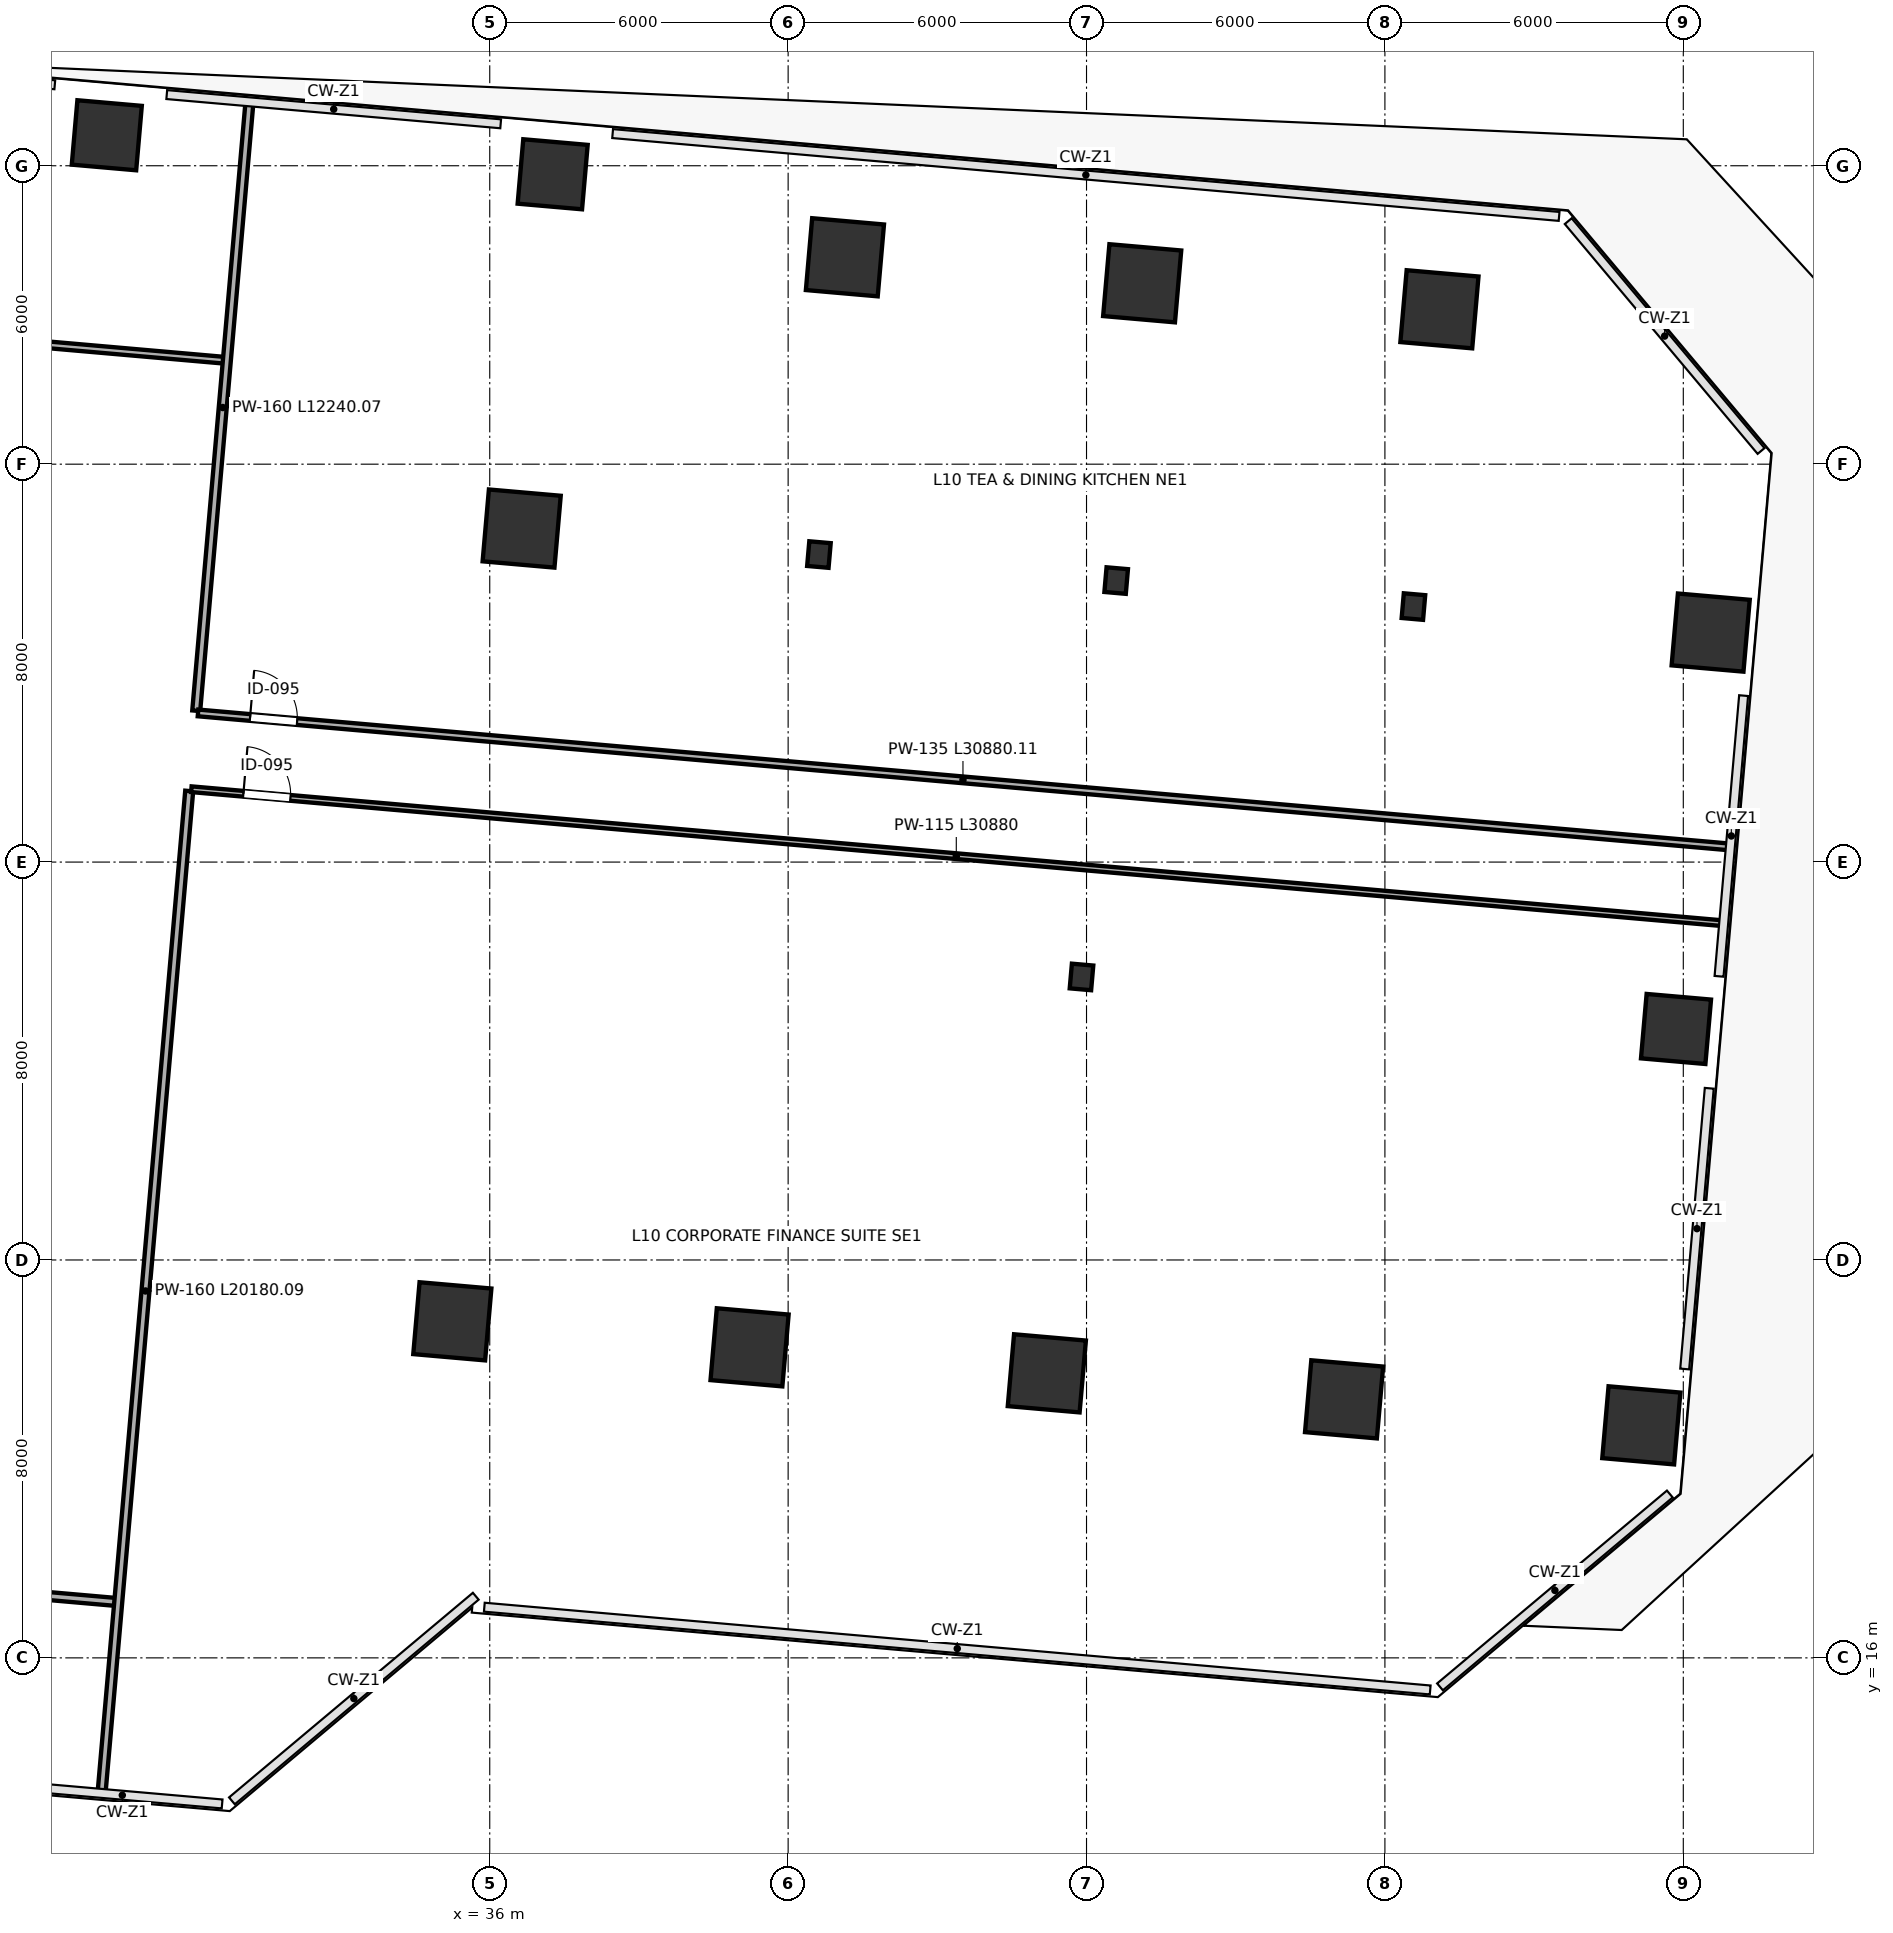
"""IFC4 building model, lengths in metres.
Left out: names, types, materials, properties, quantities, classifications, styles, units other than length and angle.
Written with IfcOpenShell. Run it as: python <this file> out.ifc"""

import sys

from ifc_helpers import new_model, si_unit, direction, frame, frame_2d, origin, origin_2d, place, context, subcontext, project, spatial, rectangle, i_section, extrude, source, transform, mapped, element, fill, save


model = new_model("IFC4")
c1 = context("Model", 3, precision=1e-05, world=origin(), true_north=direction((0.0, 1.0)))
c2 = subcontext(c1, "Body", "Model", "MODEL_VIEW")
j1 = project(units=[si_unit("LENGTHUNIT", "METRE"), si_unit("PLANEANGLEUNIT", "RADIAN")], contexts=[c1])
p1 = place(None, origin())
s1 = spatial("IfcSite", under=j1, at=p1, CompositionType="ELEMENT")
p2 = place(p1, origin())
s2 = spatial("IfcBuilding", under=s1, at=p2, CompositionType="ELEMENT")
p3 = place(p2, frame((0.0, 0.0, 47.2)))
s3 = spatial("IfcBuildingStorey", under=s2, at=p3, CompositionType="ELEMENT", Elevation=47.2)
m1 = source(origin(), c2, "Body", "SweptSolid", [
    extrude(rectangle(XDim=1.3, YDim=1.3, at=origin_2d()), origin(), (0.0, 0.0, 1.0), 4.799),
])
p4 = place(p3, frame((28.3, 46.613, 0.001), z_axis=(0.0, 0.0, 1.0), x_axis=(-0.996194698092, 0.087155742748, 0.0)))
e1 = element("IfcColumn", 1, at=p4, inside=s3, PredefinedType="COLUMN", context=c2, shape_type="MappedRepresentation", body=[
    mapped(m1, transform((0.0, 0.0, 0.0), scale=1.0)),
])
m2 = source(origin(), c2, "Body", "SweptSolid", [
    extrude(rectangle(XDim=1.45, YDim=1.45, at=origin_2d()), origin(), (0.0, 0.0, 1.0), 4.799),
])
for number, where, z_axis, x_axis in (
    (2, (35.248, 22.767, 0.001), (0.0, 0.0, 1.0), (-0.996, 0.087, 0.0)),
    (3, (36.642, 38.706, 0.001), (0.0, 0.0, 1.0), (-0.996, 0.087, 0.0)),
):
    element("IfcColumn", number, at=place(p3, frame(where, z_axis=z_axis, x_axis=x_axis)), inside=s3, PredefinedType="COLUMN", context=c2, shape_type="MappedRepresentation", body=[
        mapped(m2, transform((0.0, 0.0, 0.0), scale=1.0)),
    ])
p5 = place(p3, frame((37.265, 45.829, 0.001), z_axis=(0.0, 0.0, 1.0), x_axis=(-0.996194698092, 0.087155742748, 0.0)))
e4 = element("IfcColumn", 4, at=p5, inside=s3, PredefinedType="COLUMN", context=c2, shape_type="MappedRepresentation", body=[
    mapped(m1, transform((0.0, 0.0, 0.0), scale=1.0)),
])
p6 = place(p3, frame((41.225, 22.244, 0.001), z_axis=(0.0, 0.0, 1.0), x_axis=(-0.996194698092, 0.087155742748, 0.0)))
e5 = element("IfcColumn", 5, at=p6, inside=s3, PredefinedType="COLUMN", context=c2, shape_type="MappedRepresentation", body=[
    mapped(m2, transform((0.0, 0.0, 0.0), scale=1.0)),
])
m3 = source(origin(), c2, "Body", "SweptSolid", [
    extrude(i_section(OverallWidth=0.432, OverallDepth=0.498, WebThickness=0.056, FlangeThickness=0.089, FilletRadius=0.015, at=origin_2d()), origin(), (0.0, 0.0, 1.0), 4.799),
])
p7 = place(p3, frame((42.619, 38.183, 0.001), z_axis=(0.0, 0.0, 1.0), x_axis=(-0.996194698092, 0.087155742748, 0.0)))
e6 = element("IfcColumn", 6, at=p7, inside=s3, PredefinedType="COLUMN", context=c2, shape_type="MappedRepresentation", body=[
    mapped(m3, transform((0.0, 0.0, 0.0), scale=1.0)),
])
for number, where, z_axis, x_axis in (
    (7, (43.142, 44.16, 0.001), (0.0, 0.0, 1.0), (-0.996, 0.087, 0.0)),
    (8, (47.202, 21.721, 0.001), (0.0, 0.0, 1.0), (-0.996, 0.087, 0.0)),
):
    element("IfcColumn", number, at=place(p3, frame(where, z_axis=z_axis, x_axis=x_axis)), inside=s3, PredefinedType="COLUMN", context=c2, shape_type="MappedRepresentation", body=[
        mapped(m2, transform((0.0, 0.0, 0.0), scale=1.0)),
    ])
for number, where, z_axis, x_axis in (
    (9, (47.899, 29.69, 0.001), (0.0, 0.0, 1.0), (-0.996, 0.087, 0.0)),
    (10, (48.596, 37.66, 0.001), (0.0, 0.0, 1.0), (-0.996, 0.087, 0.0)),
):
    element("IfcColumn", number, at=place(p3, frame(where, z_axis=z_axis, x_axis=x_axis)), inside=s3, PredefinedType="COLUMN", context=c2, shape_type="MappedRepresentation", body=[
        mapped(m3, transform((0.0, 0.0, 0.0), scale=1.0)),
    ])
for number, where, z_axis, x_axis in (
    (11, (49.119, 43.637, 0.001), (0.0, 0.0, 1.0), (-0.996, 0.087, 0.0)),
    (12, (53.179, 21.198, 0.001), (0.0, 0.0, 1.0), (-0.996, 0.087, 0.0)),
):
    element("IfcColumn", number, at=place(p3, frame(where, z_axis=z_axis, x_axis=x_axis)), inside=s3, PredefinedType="COLUMN", context=c2, shape_type="MappedRepresentation", body=[
        mapped(m2, transform((0.0, 0.0, 0.0), scale=1.0)),
    ])
p8 = place(p3, frame((54.573, 37.137, 0.001), z_axis=(0.0, 0.0, 1.0), x_axis=(-0.996194698092, 0.087155742748, 0.0)))
e13 = element("IfcColumn", 13, at=p8, inside=s3, PredefinedType="COLUMN", context=c2, shape_type="MappedRepresentation", body=[
    mapped(m3, transform((0.0, 0.0, 0.0), scale=1.0)),
])
p9 = place(p3, frame((55.096, 43.114, 0.001), z_axis=(0.0, 0.0, 1.0), x_axis=(-0.996194698092, 0.087155742748, 0.0)))
e14 = element("IfcColumn", 14, at=p9, inside=s3, PredefinedType="COLUMN", context=c2, shape_type="MappedRepresentation", body=[
    mapped(m2, transform((0.0, 0.0, 0.0), scale=1.0)),
])
m4 = source(origin(), c2, "Body", "SweptSolid", [
    extrude(rectangle(XDim=1.45, YDim=1.45, at=origin_2d()), origin(), (0.0, 0.0, 1.0), 4.799),
])
p10 = place(p3, frame((59.156, 20.675, 0.001), z_axis=(0.0, 0.0, 1.0), x_axis=(-0.996194698092, 0.087155742748, 0.0)))
e15 = element("IfcColumn", 15, at=p10, inside=s3, PredefinedType="COLUMN", context=c2, shape_type="MappedRepresentation", body=[
    mapped(m4, transform((0.0, 0.0, 0.0), scale=1.0)),
])
p11 = place(p3, frame((59.854, 28.645, 0.001), z_axis=(0.0, 0.0, 1.0), x_axis=(-0.996194698092, 0.087155742748, 0.0)))
e16 = element("IfcColumn", 16, at=p11, inside=s3, PredefinedType="COLUMN", context=c2, shape_type="MappedRepresentation", body=[
    mapped(m1, transform((0.0, 0.0, 0.0), scale=1.0)),
])
p12 = place(p3, frame((60.551, 36.614, 0.001), z_axis=(0.0, 0.0, 1.0), x_axis=(-0.996194698092, 0.087155742748, 0.0)))
e17 = element("IfcColumn", 17, at=p12, inside=s3, PredefinedType="COLUMN", context=c2, shape_type="MappedRepresentation", body=[
    mapped(m4, transform((0.0, 0.0, 0.0), scale=1.0)),
])
p13 = place(p3, frame((10.987, 18.656, 0.0), z_axis=(0.0, 0.0, 1.0), x_axis=(0.99619508988, -0.087151264471, 0.0)))
e18 = element("IfcWall", 18, at=p13, inside=s3, PredefinedType="PARTITIONING", context=c2, shape_type="SweptSolid", body=[
    extrude(rectangle(XDim=17.57, YDim=0.16, at=frame_2d((8.785, 0.0))), origin(), (0.0, 0.0, 1.0), 4.56),
])
p14 = place(p13, frame((1.05, 0.0, 0.0)))
e19 = element("IfcOpeningElement", 19, at=p14, cuts=e18, PredefinedType="OPENING", context=c2, shape_type="SweptSolid", body=[
    extrude(rectangle(XDim=0.95, YDim=2.15, at=frame_2d((0.475, 1.075))), frame((0.0, 0.09, 0.0), z_axis=(0.0, -1.0, 0.0), x_axis=(1.0, 0.0, 0.0)), (0.0, 0.0, 1.0), 0.18),
])
p15 = place(p3, frame((5.7, 44.274, 0.0), z_axis=(0.0, 0.0, 1.0), x_axis=(0.996195324028, -0.087148587968, 0.0)))
e20 = element("IfcWall", 20, at=p15, inside=s3, PredefinedType="PARTITIONING", context=c2, shape_type="SweptSolid", body=[
    extrude(rectangle(XDim=25.07, YDim=0.135, at=frame_2d((12.535, 0.0))), origin(), (0.0, 0.0, 1.0), 4.56),
])
p16 = place(p15, frame((1.05, 0.0, 0.0)))
e21 = element("IfcOpeningElement", 21, at=p16, cuts=e20, PredefinedType="OPENING", context=c2, shape_type="SweptSolid", body=[
    extrude(rectangle(XDim=0.95, YDim=2.15, at=frame_2d((0.475, 1.075))), frame((0.0, 0.078, 0.0), z_axis=(0.0, -1.0, 0.0), x_axis=(1.0, 0.0, 0.0)), (0.0, 0.0, 1.0), 0.155),
])
p17 = place(p3, frame((30.098, 35.042, 0.0), z_axis=(0.0, 0.0, 1.0), x_axis=(0.087145176091, 0.996195622498, 0.0)))
e22 = element("IfcWall", 22, at=p17, inside=s3, PredefinedType="PARTITIONING", context=c2, shape_type="SweptSolid", body=[
    extrude(rectangle(XDim=12.24, YDim=0.16, at=frame_2d((6.12, 0.0))), origin(), (0.0, 0.0, 1.0), 3.695),
])
p18 = place(p3, frame((28.198, 13.325, 0.0), z_axis=(0.0, 0.0, 1.0), x_axis=(0.087154794008, 0.996194781095, 0.0)))
e23 = element("IfcWall", 23, at=p18, inside=s3, PredefinedType="PARTITIONING", context=c2, shape_type="SweptSolid", body=[
    extrude(rectangle(XDim=20.18, YDim=0.16, at=frame_2d((10.09, 0.0))), origin(), (0.0, 0.0, 1.0), 4.56),
])
p19 = place(p3, frame((30.134, 34.999, 0.0), z_axis=(0.0, 0.0, 1.0), x_axis=(0.996195270611, -0.087149198574, 0.0)))
e24 = element("IfcWall", 24, at=p19, inside=s3, PredefinedType="PARTITIONING", context=c2, shape_type="SweptSolid", body=[
    extrude(rectangle(XDim=30.88, YDim=0.135, at=frame_2d((15.44, 0.0))), origin(), (0.0, 0.0, 1.0), 3.695),
])
p20 = place(p19, frame((1.05, 0.0, 0.0)))
e25 = element("IfcOpeningElement", 25, at=p20, cuts=e24, PredefinedType="OPENING", context=c2, shape_type="SweptSolid", body=[
    extrude(rectangle(XDim=0.95, YDim=2.15, at=frame_2d((0.475, 1.075))), frame((0.0, 0.078, 0.0), z_axis=(0.0, -1.0, 0.0), x_axis=(1.0, 0.0, 0.0)), (0.0, 0.0, 1.0), 0.155),
])
p21 = place(p3, frame((30.0, 33.465, 0.0), z_axis=(0.0, 0.0, 1.0), x_axis=(0.996195270611, -0.087149198574, 0.0)))
e26 = element("IfcWall", 26, at=p21, inside=s3, PredefinedType="PARTITIONING", context=c2, shape_type="SweptSolid", body=[
    extrude(rectangle(XDim=30.88, YDim=0.115, at=frame_2d((15.44, 0.0))), origin(), (0.0, 0.0, 1.0), 3.695),
])
p22 = place(p21, frame((1.05, 0.0, 0.0)))
e27 = element("IfcOpeningElement", 27, at=p22, cuts=e26, PredefinedType="OPENING", context=c2, shape_type="SweptSolid", body=[
    extrude(rectangle(XDim=0.95, YDim=2.15, at=frame_2d((0.475, 1.075))), frame((0.0, 0.067, 0.0), z_axis=(0.0, -1.0, 0.0), x_axis=(1.0, 0.0, 0.0)), (0.0, 0.0, 1.0), 0.135),
])
m5 = source(origin(), c2, "Body", "SweptSolid", [
    extrude(rectangle(XDim=0.95, YDim=2.15, at=frame_2d((0.475, 1.075))), frame((0.0, 0.025, 0.0), z_axis=(0.0, -1.0, 0.0), x_axis=(1.0, 0.0, 0.0)), (0.0, 0.0, 1.0), 0.05),
])
p23 = place(p20, origin())
e28 = element("IfcDoor", 28, at=p23, inside=s3, OperationType="SINGLE_SWING_LEFT", PredefinedType="DOOR", context=c2, shape_type="MappedRepresentation", body=[
    mapped(m5, transform((0.0, 0.0, 0.0), scale=1.0)),
])
fill(e25, e28)
p24 = place(p22, origin())
e29 = element("IfcDoor", 29, at=p24, inside=s3, OperationType="SINGLE_SWING_LEFT", PredefinedType="DOOR", context=c2, shape_type="MappedRepresentation", body=[
    mapped(m5, transform((0.0, 0.0, 0.0), scale=1.0)),
])
fill(e27, e29)
save(model, sys.argv[1])
